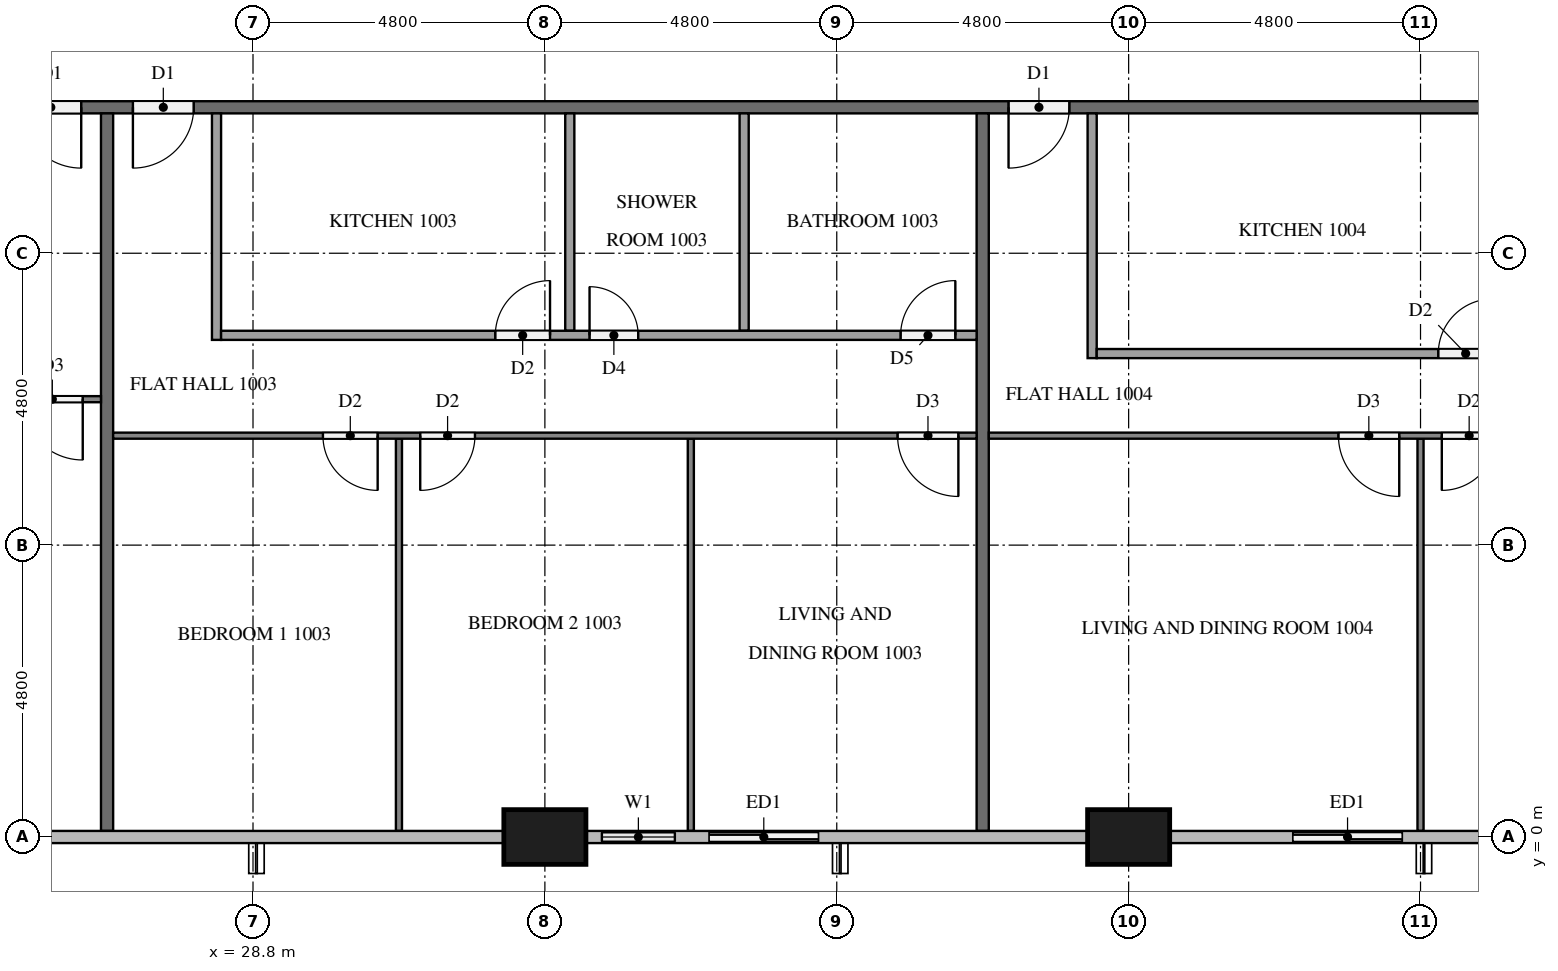
"""IFC4 building model, lengths in metres.
Left out: names, types, materials, properties, quantities, classifications, styles, units other than length and angle.
Written with IfcOpenShell. Run it as: python <this file> out.ifc"""

import sys

from ifc_helpers import new_model, si_unit, direction, frame, frame_2d, origin, origin_2d, place, context, subcontext, project, spatial, rectangle, extrude, element, fill, save


model = new_model("IFC4")
c1 = context("Model", 3, precision=1e-05, world=origin(), true_north=direction((0.0, 1.0)))
c2 = subcontext(c1, "Body", "Model", "MODEL_VIEW")
j1 = project(units=[si_unit("LENGTHUNIT", "METRE"), si_unit("PLANEANGLEUNIT", "RADIAN")], contexts=[c1])
p1 = place(None, origin())
s1 = spatial("IfcSite", under=j1, at=p1, CompositionType="ELEMENT")
p2 = place(p1, origin())
s2 = spatial("IfcBuilding", under=s1, at=p2, CompositionType="ELEMENT")
p3 = place(p2, frame((0.0, 0.0, 43.4)))
s3 = spatial("IfcBuildingStorey", under=s2, at=p3, CompositionType="ELEMENT", Elevation=43.4)
for number, where, z_axis, x_axis in (
    (1, (33.6, 0.0, 0.0), (0.0, 0.0, 1.0), (1.0, 0.0, 0.0)),
    (2, (43.2, 0.0, 0.0), (0.0, 0.0, 1.0), (1.0, 0.0, 0.0)),
):
    element("IfcColumn", number, at=place(p3, frame(where, z_axis=z_axis, x_axis=x_axis)), inside=s3, PredefinedType="COLUMN", context=c2, shape_type="SweptSolid", body=[
        extrude(rectangle(XDim=1.35, YDim=0.9, at=origin_2d()), origin(), (0.0, 0.0, 1.0), 3.2),
    ])
p4 = place(p3, frame((34.275, 0.0, 0.0), z_axis=(0.0, 0.0, 1.0), x_axis=(1.0, 0.0, 0.0)))
e3 = element("IfcWall", 3, at=p4, inside=s3, PredefinedType="SOLIDWALL", context=c2, shape_type="SweptSolid", body=[
    extrude(rectangle(XDim=4.125, YDim=0.15, at=frame_2d((2.062, 0.0))), origin(), (0.0, 0.0, 1.0), 3.2),
])
p5 = place(p4, frame((0.262, 0.0, 0.9)))
e4 = element("IfcOpeningElement", 4, at=p5, cuts=e3, PredefinedType="OPENING", context=c2, shape_type="SweptSolid", body=[
    extrude(rectangle(XDim=1.2, YDim=1.4, at=frame_2d((0.6, 0.7))), frame((0.0, 0.085, 0.0), z_axis=(0.0, -1.0, 0.0), x_axis=(1.0, 0.0, 0.0)), (0.0, 0.0, 1.0), 0.17),
])
p6 = place(p4, frame((2.025, 0.0, 0.0)))
e5 = element("IfcOpeningElement", 5, at=p6, cuts=e3, PredefinedType="OPENING", context=c2, shape_type="SweptSolid", body=[
    extrude(rectangle(XDim=1.8, YDim=2.4, at=frame_2d((0.9, 1.2))), frame((0.0, 0.085, 0.0), z_axis=(0.0, -1.0, 0.0), x_axis=(1.0, 0.0, 0.0)), (0.0, 0.0, 1.0), 0.17),
])
p7 = place(p3, frame((45.6, 0.0, 0.0), z_axis=(0.0, 0.0, 1.0), x_axis=(1.0, 0.0, 0.0)))
e6 = element("IfcWall", 6, at=p7, inside=s3, PredefinedType="SOLIDWALL", context=c2, shape_type="SweptSolid", body=[
    extrude(rectangle(XDim=2.4, YDim=0.15, at=frame_2d((1.2, 0.0))), origin(), (0.0, 0.0, 1.0), 3.2),
])
p8 = place(p7, frame((0.3, 0.0, 0.0)))
e7 = element("IfcOpeningElement", 7, at=p8, cuts=e6, PredefinedType="OPENING", context=c2, shape_type="SweptSolid", body=[
    extrude(rectangle(XDim=1.8, YDim=2.4, at=frame_2d((0.9, 1.2))), frame((0.0, 0.085, 0.0), z_axis=(0.0, -1.0, 0.0), x_axis=(1.0, 0.0, 0.0)), (0.0, 0.0, 1.0), 0.17),
])
p9 = place(p3, frame((50.5, 12.0, 0.0), z_axis=(0.0, 0.0, 1.0), x_axis=(-1.0, 0.0, 0.0)))
e8 = element("IfcWall", 8, at=p9, inside=s3, PredefinedType="PARTITIONING", context=c2, shape_type="SweptSolid", body=[
    extrude(rectangle(XDim=38.6, YDim=0.2, at=frame_2d((19.3, 0.0))), origin(), (0.0, 0.0, 1.0), 3.2),
])
p10 = place(p9, frame((36.525, 0.0, 0.0)))
e9 = element("IfcOpeningElement", 9, at=p10, cuts=e8, PredefinedType="OPENING", context=c2, shape_type="SweptSolid", body=[
    extrude(rectangle(XDim=1.0, YDim=2.1, at=frame_2d((0.5, 1.05))), frame((0.0, 0.11, 0.0), z_axis=(0.0, -1.0, 0.0), x_axis=(1.0, 0.0, 0.0)), (0.0, 0.0, 1.0), 0.22),
])
p11 = place(p9, frame((24.525, 0.0, 0.0)))
e10 = element("IfcOpeningElement", 10, at=p11, cuts=e8, PredefinedType="OPENING", context=c2, shape_type="SweptSolid", body=[
    extrude(rectangle(XDim=1.0, YDim=2.1, at=frame_2d((0.5, 1.05))), frame((0.0, 0.11, 0.0), z_axis=(0.0, -1.0, 0.0), x_axis=(1.0, 0.0, 0.0)), (0.0, 0.0, 1.0), 0.22),
])
p12 = place(p9, frame((22.675, 0.0, 0.0)))
e11 = element("IfcOpeningElement", 11, at=p12, cuts=e8, PredefinedType="OPENING", context=c2, shape_type="SweptSolid", body=[
    extrude(rectangle(XDim=1.0, YDim=2.1, at=frame_2d((0.5, 1.05))), frame((0.0, 0.11, 0.0), z_axis=(0.0, -1.0, 0.0), x_axis=(1.0, 0.0, 0.0)), (0.0, 0.0, 1.0), 0.22),
])
p13 = place(p9, frame((8.275, 0.0, 0.0)))
e12 = element("IfcOpeningElement", 12, at=p13, cuts=e8, PredefinedType="OPENING", context=c2, shape_type="SweptSolid", body=[
    extrude(rectangle(XDim=1.0, YDim=2.1, at=frame_2d((0.5, 1.05))), frame((0.0, 0.11, 0.0), z_axis=(0.0, -1.0, 0.0), x_axis=(1.0, 0.0, 0.0)), (0.0, 0.0, 1.0), 0.22),
])
for number, where, z_axis, x_axis in (
    (13, (26.4, 11.9, 0.0), (0.0, 0.0, 1.0), (0.0, -1.0, 0.0)),
    (14, (40.8, 11.9, 0.0), (0.0, 0.0, 1.0), (0.0, -1.0, 0.0)),
):
    element("IfcWall", number, at=place(p3, frame(where, z_axis=z_axis, x_axis=x_axis)), inside=s3, PredefinedType="PARTITIONING", context=c2, shape_type="SweptSolid", body=[
        extrude(rectangle(XDim=11.8, YDim=0.2, at=frame_2d((5.9, 0.0))), origin(), (0.0, 0.0, 1.0), 3.2),
    ])
p14 = place(p3, frame((26.3, 7.2, 0.0), z_axis=(0.0, 0.0, 1.0), x_axis=(-1.0, 0.0, 0.0)))
e15 = element("IfcWall", 15, at=p14, inside=s3, PredefinedType="PARTITIONING", context=c2, shape_type="SweptSolid", body=[
    extrude(rectangle(XDim=11.8, YDim=0.1, at=frame_2d((5.9, 0.0))), origin(), (0.0, 0.0, 1.0), 3.2),
])
p15 = place(p14, frame((0.3, 0.0, 0.0)))
e16 = element("IfcOpeningElement", 16, at=p15, cuts=e15, PredefinedType="OPENING", context=c2, shape_type="SweptSolid", body=[
    extrude(rectangle(XDim=1.0, YDim=2.1, at=frame_2d((0.5, 1.05))), frame((0.0, 0.06, 0.0), z_axis=(0.0, -1.0, 0.0), x_axis=(1.0, 0.0, 0.0)), (0.0, 0.0, 1.0), 0.12),
])
p16 = place(p14, frame((10.6, 0.0, 0.0)))
e17 = element("IfcOpeningElement", 17, at=p16, cuts=e15, PredefinedType="OPENING", context=c2, shape_type="SweptSolid", body=[
    extrude(rectangle(XDim=0.9, YDim=2.1, at=frame_2d((0.45, 1.05))), frame((0.0, 0.06, 0.0), z_axis=(0.0, -1.0, 0.0), x_axis=(1.0, 0.0, 0.0)), (0.0, 0.0, 1.0), 0.12),
])
for number, where, z_axis, x_axis in (
    (18, (31.2, 6.55, 0.0), (0.0, 0.0, 1.0), (0.0, -1.0, 0.0)),
    (19, (36.0, 6.55, 0.0), (0.0, 0.0, 1.0), (0.0, -1.0, 0.0)),
):
    element("IfcWall", number, at=place(p3, frame(where, z_axis=z_axis, x_axis=x_axis)), inside=s3, PredefinedType="PARTITIONING", context=c2, shape_type="SweptSolid", body=[
        extrude(rectangle(XDim=6.45, YDim=0.1, at=frame_2d((3.225, 0.0))), origin(), (0.0, 0.0, 1.0), 3.2),
    ])
p17 = place(p3, frame((40.7, 6.6, 0.0), z_axis=(0.0, 0.0, 1.0), x_axis=(-1.0, 0.0, 0.0)))
e20 = element("IfcWall", 20, at=p17, inside=s3, PredefinedType="PARTITIONING", context=c2, shape_type="SweptSolid", body=[
    extrude(rectangle(XDim=14.2, YDim=0.1, at=frame_2d((7.1, 0.0))), origin(), (0.0, 0.0, 1.0), 3.2),
])
p18 = place(p17, frame((9.85, 0.0, 0.0)))
e21 = element("IfcOpeningElement", 21, at=p18, cuts=e20, PredefinedType="OPENING", context=c2, shape_type="SweptSolid", body=[
    extrude(rectangle(XDim=0.9, YDim=2.1, at=frame_2d((0.45, 1.05))), frame((0.0, 0.06, 0.0), z_axis=(0.0, -1.0, 0.0), x_axis=(1.0, 0.0, 0.0)), (0.0, 0.0, 1.0), 0.12),
])
p19 = place(p17, frame((8.25, 0.0, 0.0)))
e22 = element("IfcOpeningElement", 22, at=p19, cuts=e20, PredefinedType="OPENING", context=c2, shape_type="SweptSolid", body=[
    extrude(rectangle(XDim=0.9, YDim=2.1, at=frame_2d((0.45, 1.05))), frame((0.0, 0.06, 0.0), z_axis=(0.0, -1.0, 0.0), x_axis=(1.0, 0.0, 0.0)), (0.0, 0.0, 1.0), 0.12),
])
p20 = place(p17, frame((0.3, 0.0, 0.0)))
e23 = element("IfcOpeningElement", 23, at=p20, cuts=e20, PredefinedType="OPENING", context=c2, shape_type="SweptSolid", body=[
    extrude(rectangle(XDim=1.0, YDim=2.1, at=frame_2d((0.5, 1.05))), frame((0.0, 0.06, 0.0), z_axis=(0.0, -1.0, 0.0), x_axis=(1.0, 0.0, 0.0)), (0.0, 0.0, 1.0), 0.12),
])
for number, where, z_axis, x_axis in (
    (24, (34.01, 11.9, 0.0), (0.0, 0.0, 1.0), (0.0, -1.0, 0.0)),
    (25, (36.877, 11.9, 0.0), (0.0, 0.0, 1.0), (0.0, -1.0, 0.0)),
):
    element("IfcWall", number, at=place(p3, frame(where, z_axis=z_axis, x_axis=x_axis)), inside=s3, PredefinedType="PARTITIONING", context=c2, shape_type="SweptSolid", body=[
        extrude(rectangle(XDim=3.575, YDim=0.15, at=frame_2d((1.788, 0.0))), origin(), (0.0, 0.0, 1.0), 3.2),
    ])
p21 = place(p3, frame((28.2, 11.9, 0.0), z_axis=(0.0, 0.0, 1.0), x_axis=(0.0, -1.0, 0.0)))
e26 = element("IfcWall", 26, at=p21, inside=s3, PredefinedType="PARTITIONING", context=c2, shape_type="SweptSolid", body=[
    extrude(rectangle(XDim=3.725, YDim=0.15, at=frame_2d((1.862, 0.0))), origin(), (0.0, 0.0, 1.0), 3.2),
])
p22 = place(p3, frame((28.275, 8.25, 0.0), z_axis=(0.0, 0.0, 1.0), x_axis=(1.0, 0.0, 0.0)))
e27 = element("IfcWall", 27, at=p22, inside=s3, PredefinedType="PARTITIONING", context=c2, shape_type="SweptSolid", body=[
    extrude(rectangle(XDim=12.425, YDim=0.15, at=frame_2d((6.212, 0.0))), origin(), (0.0, 0.0, 1.0), 3.2),
])
p23 = place(p22, frame((4.51, 0.0, 0.0)))
e28 = element("IfcOpeningElement", 28, at=p23, cuts=e27, PredefinedType="OPENING", context=c2, shape_type="SweptSolid", body=[
    extrude(rectangle(XDim=0.9, YDim=2.1, at=frame_2d((0.45, 1.05))), frame((0.0, 0.085, 0.0), z_axis=(0.0, -1.0, 0.0), x_axis=(1.0, 0.0, 0.0)), (0.0, 0.0, 1.0), 0.17),
])
p24 = place(p22, frame((6.06, 0.0, 0.0)))
e29 = element("IfcOpeningElement", 29, at=p24, cuts=e27, PredefinedType="OPENING", context=c2, shape_type="SweptSolid", body=[
    extrude(rectangle(XDim=0.8, YDim=2.1, at=frame_2d((0.4, 1.05))), frame((0.0, 0.085, 0.0), z_axis=(0.0, -1.0, 0.0), x_axis=(1.0, 0.0, 0.0)), (0.0, 0.0, 1.0), 0.17),
])
p25 = place(p22, frame((11.175, 0.0, 0.0)))
e30 = element("IfcOpeningElement", 30, at=p25, cuts=e27, PredefinedType="OPENING", context=c2, shape_type="SweptSolid", body=[
    extrude(rectangle(XDim=0.9, YDim=2.1, at=frame_2d((0.45, 1.05))), frame((0.0, 0.085, 0.0), z_axis=(0.0, -1.0, 0.0), x_axis=(1.0, 0.0, 0.0)), (0.0, 0.0, 1.0), 0.17),
])
p26 = place(p3, frame((48.0, 6.55, 0.0), z_axis=(0.0, 0.0, 1.0), x_axis=(0.0, -1.0, 0.0)))
e31 = element("IfcWall", 31, at=p26, inside=s3, PredefinedType="PARTITIONING", context=c2, shape_type="SweptSolid", body=[
    extrude(rectangle(XDim=6.45, YDim=0.1, at=frame_2d((3.225, 0.0))), origin(), (0.0, 0.0, 1.0), 3.2),
])
p27 = place(p3, frame((57.5, 6.6, 0.0), z_axis=(0.0, 0.0, 1.0), x_axis=(-1.0, 0.0, 0.0)))
e32 = element("IfcWall", 32, at=p27, inside=s3, PredefinedType="PARTITIONING", context=c2, shape_type="SweptSolid", body=[
    extrude(rectangle(XDim=16.6, YDim=0.1, at=frame_2d((8.3, 0.0))), origin(), (0.0, 0.0, 1.0), 3.2),
])
p28 = place(p27, frame((9.85, 0.0, 0.0)))
e33 = element("IfcOpeningElement", 33, at=p28, cuts=e32, PredefinedType="OPENING", context=c2, shape_type="SweptSolid", body=[
    extrude(rectangle(XDim=1.0, YDim=2.1, at=frame_2d((0.5, 1.05))), frame((0.0, 0.06, 0.0), z_axis=(0.0, -1.0, 0.0), x_axis=(1.0, 0.0, 0.0)), (0.0, 0.0, 1.0), 0.12),
])
p29 = place(p27, frame((8.25, 0.0, 0.0)))
e34 = element("IfcOpeningElement", 34, at=p29, cuts=e32, PredefinedType="OPENING", context=c2, shape_type="SweptSolid", body=[
    extrude(rectangle(XDim=0.9, YDim=2.1, at=frame_2d((0.45, 1.05))), frame((0.0, 0.06, 0.0), z_axis=(0.0, -1.0, 0.0), x_axis=(1.0, 0.0, 0.0)), (0.0, 0.0, 1.0), 0.12),
])
p30 = place(p27, frame((0.6, 0.0, 0.0)))
e35 = element("IfcOpeningElement", 35, at=p30, cuts=e32, PredefinedType="OPENING", context=c2, shape_type="SweptSolid", body=[
    extrude(rectangle(XDim=0.9, YDim=2.1, at=frame_2d((0.45, 1.05))), frame((0.0, 0.06, 0.0), z_axis=(0.0, -1.0, 0.0), x_axis=(1.0, 0.0, 0.0)), (0.0, 0.0, 1.0), 0.12),
])
p31 = place(p3, frame((42.6, 11.9, 0.0), z_axis=(0.0, 0.0, 1.0), x_axis=(0.0, -1.0, 0.0)))
e36 = element("IfcWall", 36, at=p31, inside=s3, PredefinedType="PARTITIONING", context=c2, shape_type="SweptSolid", body=[
    extrude(rectangle(XDim=4.025, YDim=0.15, at=frame_2d((2.012, 0.0))), origin(), (0.0, 0.0, 1.0), 3.2),
])
p32 = place(p3, frame((42.675, 7.95, 0.0), z_axis=(0.0, 0.0, 1.0), x_axis=(1.0, 0.0, 0.0)))
e37 = element("IfcWall", 37, at=p32, inside=s3, PredefinedType="PARTITIONING", context=c2, shape_type="SweptSolid", body=[
    extrude(rectangle(XDim=14.825, YDim=0.15, at=frame_2d((7.413, 0.0))), origin(), (0.0, 0.0, 1.0), 3.2),
])
p33 = place(p32, frame((5.617, 0.0, 0.0)))
e38 = element("IfcOpeningElement", 38, at=p33, cuts=e37, PredefinedType="OPENING", context=c2, shape_type="SweptSolid", body=[
    extrude(rectangle(XDim=0.9, YDim=2.1, at=frame_2d((0.45, 1.05))), frame((0.0, 0.085, 0.0), z_axis=(0.0, -1.0, 0.0), x_axis=(1.0, 0.0, 0.0)), (0.0, 0.0, 1.0), 0.17),
])
p34 = place(p32, frame((7.167, 0.0, 0.0)))
e39 = element("IfcOpeningElement", 39, at=p34, cuts=e37, PredefinedType="OPENING", context=c2, shape_type="SweptSolid", body=[
    extrude(rectangle(XDim=0.9, YDim=2.1, at=frame_2d((0.45, 1.05))), frame((0.0, 0.085, 0.0), z_axis=(0.0, -1.0, 0.0), x_axis=(1.0, 0.0, 0.0)), (0.0, 0.0, 1.0), 0.17),
])
p35 = place(p32, frame((13.675, 0.0, 0.0)))
e40 = element("IfcOpeningElement", 40, at=p35, cuts=e37, PredefinedType="OPENING", context=c2, shape_type="SweptSolid", body=[
    extrude(rectangle(XDim=0.8, YDim=2.1, at=frame_2d((0.4, 1.05))), frame((0.0, 0.085, 0.0), z_axis=(0.0, -1.0, 0.0), x_axis=(1.0, 0.0, 0.0)), (0.0, 0.0, 1.0), 0.17),
])
p36 = place(p5, origin())
e41 = element("IfcWindow", 41, at=p36, inside=s3, PartitioningType="SINGLE_PANEL", PredefinedType="WINDOW", context=c2, shape_type="SweptSolid", body=[
    extrude(rectangle(XDim=1.2, YDim=1.4, at=frame_2d((0.6, 0.7))), frame((0.0, 0.03, 0.0), z_axis=(0.0, -1.0, 0.0), x_axis=(1.0, 0.0, 0.0)), (0.0, 0.0, 1.0), 0.06),
])
fill(e4, e41)
p37 = place(p6, origin())
e42 = element("IfcDoor", 42, at=p37, inside=s3, OperationType="SLIDING_TO_RIGHT", PredefinedType="DOOR", context=c2, shape_type="SweptSolid", body=[
    extrude(rectangle(XDim=1.8, YDim=2.4, at=frame_2d((0.9, 1.2))), frame((0.0, 0.025, 0.0), z_axis=(0.0, -1.0, 0.0), x_axis=(1.0, 0.0, 0.0)), (0.0, 0.0, 1.0), 0.05),
])
fill(e5, e42)
p38 = place(p8, origin())
e43 = element("IfcDoor", 43, at=p38, inside=s3, OperationType="SLIDING_TO_LEFT", PredefinedType="DOOR", context=c2, shape_type="SweptSolid", body=[
    extrude(rectangle(XDim=1.8, YDim=2.4, at=frame_2d((0.9, 1.2))), frame((0.0, 0.025, 0.0), z_axis=(0.0, -1.0, 0.0), x_axis=(1.0, 0.0, 0.0)), (0.0, 0.0, 1.0), 0.05),
])
fill(e7, e43)
p39 = place(p11, origin())
e44 = element("IfcDoor", 44, at=p39, inside=s3, OperationType="SINGLE_SWING_LEFT", PredefinedType="DOOR", context=c2, shape_type="SweptSolid", body=[
    extrude(rectangle(XDim=1.0, YDim=2.1, at=frame_2d((0.5, 1.05))), frame((0.0, 0.025, 0.0), z_axis=(0.0, -1.0, 0.0), x_axis=(1.0, 0.0, 0.0)), (0.0, 0.0, 1.0), 0.05),
])
fill(e10, e44)
p40 = place(p12, origin())
e45 = element("IfcDoor", 45, at=p40, inside=s3, OperationType="SINGLE_SWING_RIGHT", PredefinedType="DOOR", context=c2, shape_type="SweptSolid", body=[
    extrude(rectangle(XDim=1.0, YDim=2.1, at=frame_2d((0.5, 1.05))), frame((0.0, 0.025, 0.0), z_axis=(0.0, -1.0, 0.0), x_axis=(1.0, 0.0, 0.0)), (0.0, 0.0, 1.0), 0.05),
])
fill(e11, e45)
p41 = place(p13, origin())
e46 = element("IfcDoor", 46, at=p41, inside=s3, OperationType="SINGLE_SWING_RIGHT", PredefinedType="DOOR", context=c2, shape_type="SweptSolid", body=[
    extrude(rectangle(XDim=1.0, YDim=2.1, at=frame_2d((0.5, 1.05))), frame((0.0, 0.025, 0.0), z_axis=(0.0, -1.0, 0.0), x_axis=(1.0, 0.0, 0.0)), (0.0, 0.0, 1.0), 0.05),
])
fill(e12, e46)
p42 = place(p15, origin())
e47 = element("IfcDoor", 47, at=p42, inside=s3, OperationType="SINGLE_SWING_LEFT", PredefinedType="DOOR", context=c2, shape_type="SweptSolid", body=[
    extrude(rectangle(XDim=1.0, YDim=2.1, at=frame_2d((0.5, 1.05))), frame((0.0, 0.025, 0.0), z_axis=(0.0, -1.0, 0.0), x_axis=(1.0, 0.0, 0.0)), (0.0, 0.0, 1.0), 0.05),
])
fill(e16, e47)
p43 = place(p18, origin())
e48 = element("IfcDoor", 48, at=p43, inside=s3, OperationType="SINGLE_SWING_LEFT", PredefinedType="DOOR", context=c2, shape_type="SweptSolid", body=[
    extrude(rectangle(XDim=0.9, YDim=2.1, at=frame_2d((0.45, 1.05))), frame((0.0, 0.025, 0.0), z_axis=(0.0, -1.0, 0.0), x_axis=(1.0, 0.0, 0.0)), (0.0, 0.0, 1.0), 0.05),
])
fill(e21, e48)
p44 = place(p19, origin())
e49 = element("IfcDoor", 49, at=p44, inside=s3, OperationType="SINGLE_SWING_RIGHT", PredefinedType="DOOR", context=c2, shape_type="SweptSolid", body=[
    extrude(rectangle(XDim=0.9, YDim=2.1, at=frame_2d((0.45, 1.05))), frame((0.0, 0.025, 0.0), z_axis=(0.0, -1.0, 0.0), x_axis=(1.0, 0.0, 0.0)), (0.0, 0.0, 1.0), 0.05),
])
fill(e22, e49)
p45 = place(p20, origin())
e50 = element("IfcDoor", 50, at=p45, inside=s3, OperationType="SINGLE_SWING_LEFT", PredefinedType="DOOR", context=c2, shape_type="SweptSolid", body=[
    extrude(rectangle(XDim=1.0, YDim=2.1, at=frame_2d((0.5, 1.05))), frame((0.0, 0.025, 0.0), z_axis=(0.0, -1.0, 0.0), x_axis=(1.0, 0.0, 0.0)), (0.0, 0.0, 1.0), 0.05),
])
fill(e23, e50)
p46 = place(p23, origin())
e51 = element("IfcDoor", 51, at=p46, inside=s3, OperationType="SINGLE_SWING_RIGHT", PredefinedType="DOOR", context=c2, shape_type="SweptSolid", body=[
    extrude(rectangle(XDim=0.9, YDim=2.1, at=frame_2d((0.45, 1.05))), frame((0.0, 0.025, 0.0), z_axis=(0.0, -1.0, 0.0), x_axis=(1.0, 0.0, 0.0)), (0.0, 0.0, 1.0), 0.05),
])
fill(e28, e51)
p47 = place(p24, origin())
e52 = element("IfcDoor", 52, at=p47, inside=s3, OperationType="SINGLE_SWING_LEFT", PredefinedType="DOOR", context=c2, shape_type="SweptSolid", body=[
    extrude(rectangle(XDim=0.8, YDim=2.1, at=frame_2d((0.4, 1.05))), frame((0.0, 0.025, 0.0), z_axis=(0.0, -1.0, 0.0), x_axis=(1.0, 0.0, 0.0)), (0.0, 0.0, 1.0), 0.05),
])
fill(e29, e52)
p48 = place(p25, origin())
e53 = element("IfcDoor", 53, at=p48, inside=s3, OperationType="SINGLE_SWING_RIGHT", PredefinedType="DOOR", context=c2, shape_type="SweptSolid", body=[
    extrude(rectangle(XDim=0.9, YDim=2.1, at=frame_2d((0.45, 1.05))), frame((0.0, 0.025, 0.0), z_axis=(0.0, -1.0, 0.0), x_axis=(1.0, 0.0, 0.0)), (0.0, 0.0, 1.0), 0.05),
])
fill(e30, e53)
p49 = place(p28, origin())
e54 = element("IfcDoor", 54, at=p49, inside=s3, OperationType="SINGLE_SWING_LEFT", PredefinedType="DOOR", context=c2, shape_type="SweptSolid", body=[
    extrude(rectangle(XDim=1.0, YDim=2.1, at=frame_2d((0.5, 1.05))), frame((0.0, 0.025, 0.0), z_axis=(0.0, -1.0, 0.0), x_axis=(1.0, 0.0, 0.0)), (0.0, 0.0, 1.0), 0.05),
])
fill(e33, e54)
p50 = place(p29, origin())
e55 = element("IfcDoor", 55, at=p50, inside=s3, OperationType="SINGLE_SWING_RIGHT", PredefinedType="DOOR", context=c2, shape_type="SweptSolid", body=[
    extrude(rectangle(XDim=0.9, YDim=2.1, at=frame_2d((0.45, 1.05))), frame((0.0, 0.025, 0.0), z_axis=(0.0, -1.0, 0.0), x_axis=(1.0, 0.0, 0.0)), (0.0, 0.0, 1.0), 0.05),
])
fill(e34, e55)
p51 = place(p33, origin())
e56 = element("IfcDoor", 56, at=p51, inside=s3, OperationType="SINGLE_SWING_RIGHT", PredefinedType="DOOR", context=c2, shape_type="SweptSolid", body=[
    extrude(rectangle(XDim=0.9, YDim=2.1, at=frame_2d((0.45, 1.05))), frame((0.0, 0.025, 0.0), z_axis=(0.0, -1.0, 0.0), x_axis=(1.0, 0.0, 0.0)), (0.0, 0.0, 1.0), 0.05),
])
fill(e38, e56)
save(model, sys.argv[1])
